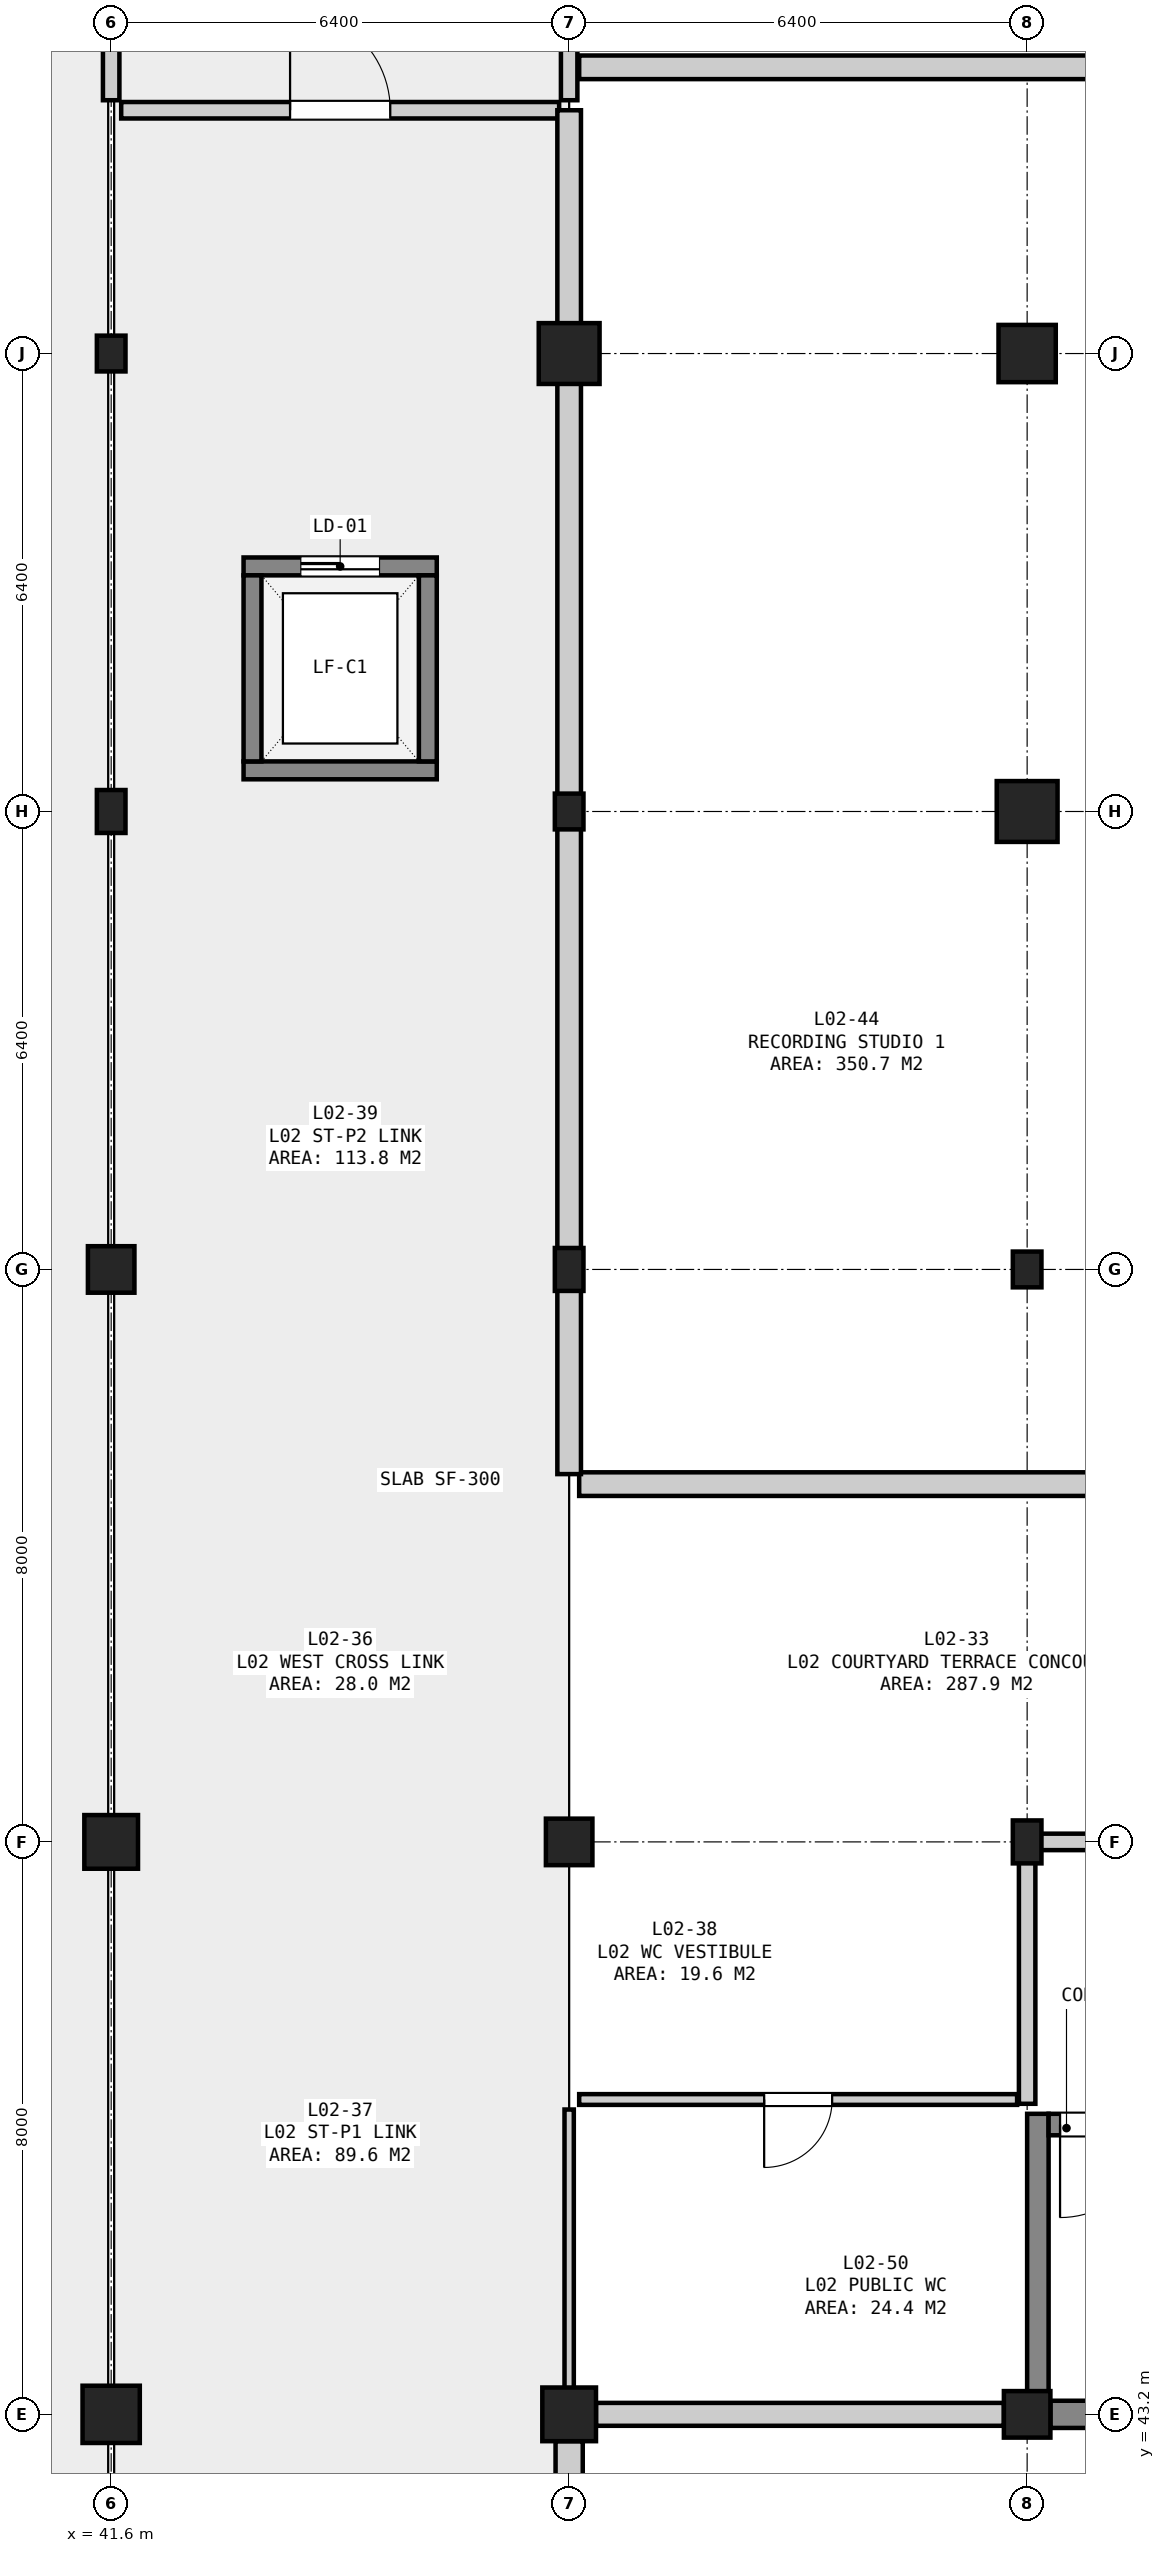
"""IFC4 building model, lengths in metres.
Left out: names, types, materials, properties, quantities, classifications, styles, units other than length and angle.
Written with IfcOpenShell. Run it as: python <this file> out.ifc"""

import sys

from ifc_helpers import new_model, si_unit, direction, frame, frame_2d, origin, origin_2d, place, context, subcontext, project, spatial, rectangle, extrude, element, fill, save


model = new_model("IFC4")
c1 = context("Model", 3, precision=1e-05, world=origin(), true_north=direction((0.0, 1.0)))
c2 = subcontext(c1, "Body", "Model", "MODEL_VIEW")
j1 = project(units=[si_unit("LENGTHUNIT", "METRE"), si_unit("PLANEANGLEUNIT", "RADIAN")], contexts=[c1])
p1 = place(None, origin())
s1 = spatial("IfcSite", under=j1, at=p1, CompositionType="ELEMENT")
p2 = place(p1, origin())
s2 = spatial("IfcBuilding", under=s1, at=p2, CompositionType="ELEMENT")
p3 = place(p2, frame((0.0, 0.0, 10.8)))
s3 = spatial("IfcBuildingStorey", under=s2, at=p3, CompositionType="ELEMENT", Elevation=10.8)
p4 = place(p3, frame((41.6, 43.2, 0.0), z_axis=(0.0, 0.0, 1.0), x_axis=(1.0, 0.0, 0.0)))
e1 = element("IfcColumn", 1, at=p4, inside=s3, PredefinedType="COLUMN", context=c2, shape_type="SweptSolid", body=[
    extrude(rectangle(XDim=0.8, YDim=0.8, at=origin_2d()), origin(), (0.0, 0.0, 1.0), 4.8),
])
p5 = place(p3, frame((41.6, 51.2, 0.0), z_axis=(0.0, 0.0, 1.0), x_axis=(1.0, 0.0, 0.0)))
e2 = element("IfcColumn", 2, at=p5, inside=s3, PredefinedType="COLUMN", context=c2, shape_type="SweptSolid", body=[
    extrude(rectangle(XDim=0.75, YDim=0.75, at=origin_2d()), origin(), (0.0, 0.0, 1.0), 4.8),
])
p6 = place(p3, frame((41.6, 59.2, 0.0), z_axis=(0.0, 0.0, 1.0), x_axis=(1.0, 0.0, 0.0)))
e3 = element("IfcColumn", 3, at=p6, inside=s3, PredefinedType="COLUMN", context=c2, shape_type="SweptSolid", body=[
    extrude(rectangle(XDim=0.65, YDim=0.65, at=origin_2d()), origin(), (0.0, 0.0, 1.0), 4.8),
])
p7 = place(p3, frame((41.6, 65.6, 0.0), z_axis=(0.0, 0.0, 1.0), x_axis=(1.0, 0.0, 0.0)))
e4 = element("IfcColumn", 4, at=p7, inside=s3, PredefinedType="COLUMN", context=c2, shape_type="SweptSolid", body=[
    extrude(rectangle(XDim=0.4, YDim=0.6, at=origin_2d()), origin(), (0.0, 0.0, 1.0), 4.8),
])
p8 = place(p3, frame((41.6, 72.0, 0.0), z_axis=(0.0, 0.0, 1.0), x_axis=(1.0, 0.0, 0.0)))
e5 = element("IfcColumn", 5, at=p8, inside=s3, PredefinedType="COLUMN", context=c2, shape_type="SweptSolid", body=[
    extrude(rectangle(XDim=0.4, YDim=0.5, at=origin_2d()), origin(), (0.0, 0.0, 1.0), 4.8),
])
p9 = place(p3, frame((48.0, 43.2, 0.0), z_axis=(0.0, 0.0, 1.0), x_axis=(1.0, 0.0, 0.0)))
e6 = element("IfcColumn", 6, at=p9, inside=s3, PredefinedType="COLUMN", context=c2, shape_type="SweptSolid", body=[
    extrude(rectangle(XDim=0.75, YDim=0.75, at=origin_2d()), origin(), (0.0, 0.0, 1.0), 4.8),
])
p10 = place(p3, frame((48.0, 51.2, 0.0), z_axis=(0.0, 0.0, 1.0), x_axis=(1.0, 0.0, 0.0)))
e7 = element("IfcColumn", 7, at=p10, inside=s3, PredefinedType="COLUMN", context=c2, shape_type="SweptSolid", body=[
    extrude(rectangle(XDim=0.65, YDim=0.65, at=origin_2d()), origin(), (0.0, 0.0, 1.0), 4.8),
])
p11 = place(p3, frame((48.0, 59.2, 0.0), z_axis=(0.0, 0.0, 1.0), x_axis=(1.0, 0.0, 0.0)))
e8 = element("IfcColumn", 8, at=p11, inside=s3, PredefinedType="COLUMN", context=c2, shape_type="SweptSolid", body=[
    extrude(rectangle(XDim=0.4, YDim=0.6, at=origin_2d()), origin(), (0.0, 0.0, 1.0), 4.8),
])
p12 = place(p3, frame((48.0, 65.6, 0.0), z_axis=(0.0, 0.0, 1.0), x_axis=(1.0, 0.0, 0.0)))
e9 = element("IfcColumn", 9, at=p12, inside=s3, PredefinedType="COLUMN", context=c2, shape_type="SweptSolid", body=[
    extrude(rectangle(XDim=0.4, YDim=0.5, at=origin_2d()), origin(), (0.0, 0.0, 1.0), 4.8),
])
p13 = place(p3, frame((48.0, 72.0, 0.0), z_axis=(0.0, 0.0, 1.0), x_axis=(1.0, 0.0, 0.0)))
e10 = element("IfcColumn", 10, at=p13, inside=s3, PredefinedType="COLUMN", context=c2, shape_type="SweptSolid", body=[
    extrude(rectangle(XDim=0.85, YDim=0.85, at=origin_2d()), origin(), (0.0, 0.0, 1.0), 4.8),
])
p14 = place(p3, frame((54.4, 43.2, 0.0), z_axis=(0.0, 0.0, 1.0), x_axis=(1.0, 0.0, 0.0)))
e11 = element("IfcColumn", 11, at=p14, inside=s3, PredefinedType="COLUMN", context=c2, shape_type="SweptSolid", body=[
    extrude(rectangle(XDim=0.65, YDim=0.65, at=origin_2d()), origin(), (0.0, 0.0, 1.0), 4.8),
])
p15 = place(p3, frame((54.4, 51.2, 0.0), z_axis=(0.0, 0.0, 1.0), x_axis=(1.0, 0.0, 0.0)))
e12 = element("IfcColumn", 12, at=p15, inside=s3, PredefinedType="COLUMN", context=c2, shape_type="SweptSolid", body=[
    extrude(rectangle(XDim=0.4, YDim=0.6, at=origin_2d()), origin(), (0.0, 0.0, 1.0), 4.8),
])
p16 = place(p3, frame((54.4, 59.2, 0.0), z_axis=(0.0, 0.0, 1.0), x_axis=(1.0, 0.0, 0.0)))
e13 = element("IfcColumn", 13, at=p16, inside=s3, PredefinedType="COLUMN", context=c2, shape_type="SweptSolid", body=[
    extrude(rectangle(XDim=0.4, YDim=0.5, at=origin_2d()), origin(), (0.0, 0.0, 1.0), 4.8),
])
p17 = place(p3, frame((54.4, 65.6, 0.0), z_axis=(0.0, 0.0, 1.0), x_axis=(1.0, 0.0, 0.0)))
e14 = element("IfcColumn", 14, at=p17, inside=s3, PredefinedType="COLUMN", context=c2, shape_type="SweptSolid", body=[
    extrude(rectangle(XDim=0.85, YDim=0.85, at=origin_2d()), origin(), (0.0, 0.0, 1.0), 4.8),
])
p18 = place(p3, frame((54.4, 72.0, 0.0), z_axis=(0.0, 0.0, 1.0), x_axis=(1.0, 0.0, 0.0)))
e15 = element("IfcColumn", 15, at=p18, inside=s3, PredefinedType="COLUMN", context=c2, shape_type="SweptSolid", body=[
    extrude(rectangle(XDim=0.8, YDim=0.8, at=origin_2d()), origin(), (0.0, 0.0, 1.0), 4.8),
])
p19 = place(p3, frame((48.0, 36.4, 0.0), z_axis=(0.0, 0.0, 1.0), x_axis=(0.0, 1.0, 0.0)))
e16 = element("IfcWall", 16, at=p19, inside=s3, PredefinedType="SOLIDWALL", context=c2, shape_type="SweptSolid", body=[
    extrude(rectangle(XDim=6.425, YDim=0.38, at=frame_2d((3.212, 0.0))), origin(), (0.0, 0.0, 1.0), 3.89),
])
p20 = place(p19, frame((1.462, 0.0, 0.9)))
e17 = element("IfcOpeningElement", 17, at=p20, cuts=e16, PredefinedType="OPENING", context=c2, shape_type="SweptSolid", body=[
    extrude(rectangle(XDim=1.8, YDim=2.1, at=frame_2d((0.9, 1.05))), frame((0.0, 0.202, 0.0), z_axis=(0.0, -1.0, 0.0), x_axis=(1.0, 0.0, 0.0)), (0.0, 0.0, 1.0), 0.404),
])
p21 = place(p3, frame((48.375, 43.2, 0.0), z_axis=(0.0, 0.0, 1.0), x_axis=(1.0, 0.0, 0.0)))
e18 = element("IfcWall", 18, at=p21, inside=s3, PredefinedType="SOLIDWALL", context=c2, shape_type="SweptSolid", body=[
    extrude(rectangle(XDim=5.7, YDim=0.32, at=frame_2d((2.85, 0.0))), origin(), (0.0, 0.0, 1.0), 3.9),
])
p22 = place(p3, frame((54.725, 43.2, 0.0), z_axis=(0.0, 0.0, 1.0), x_axis=(1.0, 0.0, 0.0)))
e19 = element("IfcWall", 19, at=p22, inside=s3, PredefinedType="SOLIDWALL", context=c2, shape_type="SweptSolid", body=[
    extrude(rectangle(XDim=7.475, YDim=0.38, at=frame_2d((3.737, 0.0))), origin(), (0.0, 0.0, 1.0), 4.195),
])
p23 = place(p22, frame((2.938, 0.0, 0.9)))
e20 = element("IfcOpeningElement", 20, at=p23, cuts=e19, PredefinedType="OPENING", context=c2, shape_type="SweptSolid", body=[
    extrude(rectangle(XDim=1.6, YDim=1.95, at=frame_2d((0.8, 0.975))), frame((0.0, 0.202, 0.0), z_axis=(0.0, -1.0, 0.0), x_axis=(1.0, 0.0, 0.0)), (0.0, 0.0, 1.0), 0.404),
])
p24 = place(p3, frame((54.55, 43.2, 0.0), z_axis=(0.0, 0.0, 1.0), x_axis=(0.0, 1.0, 0.0)))
e21 = element("IfcWall", 21, at=p24, inside=s3, PredefinedType="SHEAR", context=c2, shape_type="SweptSolid", body=[
    extrude(rectangle(XDim=4.2, YDim=0.3, at=frame_2d((2.1, 0.0))), origin(), (0.0, 0.0, 1.0), 4.5),
])
p25 = place(p3, frame((54.7, 47.25, 0.0), z_axis=(0.0, 0.0, 1.0), x_axis=(1.0, 0.0, 0.0)))
e22 = element("IfcWall", 22, at=p25, inside=s3, PredefinedType="SHEAR", context=c2, shape_type="SweptSolid", body=[
    extrude(rectangle(XDim=7.4, YDim=0.3, at=frame_2d((3.7, 0.0))), origin(), (0.0, 0.0, 1.0), 4.5),
])
p26 = place(p25, frame((0.16, 0.0, 0.0)))
e23 = element("IfcOpeningElement", 23, at=p26, cuts=e22, PredefinedType="OPENING", context=c2, shape_type="SweptSolid", body=[
    extrude(rectangle(XDim=1.3, YDim=2.18, at=frame_2d((0.65, 1.09))), frame((0.0, 0.162, 0.0), z_axis=(0.0, -1.0, 0.0), x_axis=(1.0, 0.0, 0.0)), (0.0, 0.0, 1.0), 0.324),
])
p27 = place(p3, frame((43.45, 66.175, 0.0), z_axis=(0.0, 0.0, 1.0), x_axis=(1.0, 0.0, 0.0)))
e24 = element("IfcWall", 24, at=p27, inside=s3, PredefinedType="SHEAR", context=c2, shape_type="SweptSolid", body=[
    extrude(rectangle(XDim=2.7, YDim=0.25, at=frame_2d((1.35, 0.0))), origin(), (0.0, 0.0, 1.0), 4.5),
])
p28 = place(p3, frame((43.45, 69.025, 0.0), z_axis=(0.0, 0.0, 1.0), x_axis=(1.0, 0.0, 0.0)))
e25 = element("IfcWall", 25, at=p28, inside=s3, PredefinedType="SHEAR", context=c2, shape_type="SweptSolid", body=[
    extrude(rectangle(XDim=2.7, YDim=0.25, at=frame_2d((1.35, 0.0))), origin(), (0.0, 0.0, 1.0), 4.5),
])
p29 = place(p28, frame((0.8, 0.0, 0.0)))
e26 = element("IfcOpeningElement", 26, at=p29, cuts=e25, PredefinedType="OPENING", context=c2, shape_type="SweptSolid", body=[
    extrude(rectangle(XDim=1.1, YDim=2.15, at=frame_2d((0.55, 1.075))), frame((0.0, 0.137, 0.0), z_axis=(0.0, -1.0, 0.0), x_axis=(1.0, 0.0, 0.0)), (0.0, 0.0, 1.0), 0.274),
])
for number, where, z_axis, x_axis in (
    (27, (43.575, 66.3, 0.0), (0.0, 0.0, 1.0), (0.0, 1.0, 0.0)),
    (28, (46.025, 66.3, 0.0), (0.0, 0.0, 1.0), (0.0, 1.0, 0.0)),
):
    element("IfcWall", number, at=place(p3, frame(where, z_axis=z_axis, x_axis=x_axis)), inside=s3, PredefinedType="SHEAR", context=c2, shape_type="SweptSolid", body=[
        extrude(rectangle(XDim=2.6, YDim=0.25, at=frame_2d((1.3, 0.0))), origin(), (0.0, 0.0, 1.0), 4.5),
    ])
p30 = place(p3, frame((41.74, 75.4, 0.0), z_axis=(0.0, 0.0, 1.0), x_axis=(1.0, 0.0, 0.0)))
e29 = element("IfcWall", 29, at=p30, inside=s3, PredefinedType="SOLIDWALL", context=c2, shape_type="SweptSolid", body=[
    extrude(rectangle(XDim=6.12, YDim=0.23, at=frame_2d((3.06, 0.0))), origin(), (0.0, 0.0, 1.0), 4.5),
])
p31 = place(p30, frame((2.36, 0.0, 0.0)))
e30 = element("IfcOpeningElement", 30, at=p31, cuts=e29, PredefinedType="OPENING", context=c2, shape_type="SweptSolid", body=[
    extrude(rectangle(XDim=1.4, YDim=2.2, at=frame_2d((0.7, 1.1))), frame((0.0, 0.127, 0.0), z_axis=(0.0, -1.0, 0.0), x_axis=(1.0, 0.0, 0.0)), (0.0, 0.0, 1.0), 0.254),
])
p32 = place(p3, frame((41.6, 75.54, 0.0), z_axis=(0.0, 0.0, 1.0), x_axis=(0.0, 1.0, 0.0)))
e31 = element("IfcWall", 31, at=p32, inside=s3, PredefinedType="SOLIDWALL", context=c2, shape_type="SweptSolid", body=[
    extrude(rectangle(XDim=3.52, YDim=0.23, at=frame_2d((1.76, 0.0))), origin(), (0.0, 0.0, 1.0), 4.5),
])
p33 = place(p3, frame((48.0, 75.54, 0.0), z_axis=(0.0, 0.0, 1.0), x_axis=(0.0, 1.0, 0.0)))
e32 = element("IfcWall", 32, at=p33, inside=s3, PredefinedType="SOLIDWALL", context=c2, shape_type="SweptSolid", body=[
    extrude(rectangle(XDim=3.52, YDim=0.23, at=frame_2d((1.76, 0.0))), origin(), (0.0, 0.0, 1.0), 3.9),
])
p34 = place(p3, frame((54.54, 51.2, 0.0), z_axis=(0.0, 0.0, 1.0), x_axis=(1.0, 0.0, 0.0)))
e33 = element("IfcWall", 33, at=p34, inside=s3, PredefinedType="SOLIDWALL", context=c2, shape_type="SweptSolid", body=[
    extrude(rectangle(XDim=7.655, YDim=0.23, at=frame_2d((3.828, 0.0))), origin(), (0.0, 0.0, 1.0), 3.695),
])
p35 = place(p34, frame((3.56, 0.0, 0.0)))
e34 = element("IfcOpeningElement", 34, at=p35, cuts=e33, PredefinedType="OPENING", context=c2, shape_type="SweptSolid", body=[
    extrude(rectangle(XDim=1.4, YDim=2.2, at=frame_2d((0.7, 1.1))), frame((0.0, 0.127, 0.0), z_axis=(0.0, -1.0, 0.0), x_axis=(1.0, 0.0, 0.0)), (0.0, 0.0, 1.0), 0.254),
])
p36 = place(p3, frame((54.4, 47.54, 0.0), z_axis=(0.0, 0.0, 1.0), x_axis=(0.0, 1.0, 0.0)))
e35 = element("IfcWall", 35, at=p36, inside=s3, PredefinedType="SOLIDWALL", context=c2, shape_type="SweptSolid", body=[
    extrude(rectangle(XDim=3.52, YDim=0.23, at=frame_2d((1.76, 0.0))), origin(), (0.0, 0.0, 1.0), 3.745),
])
p37 = place(p3, frame((48.14, 56.2, 0.0), z_axis=(0.0, 0.0, 1.0), x_axis=(1.0, 0.0, 0.0)))
e36 = element("IfcWall", 36, at=p37, inside=s3, PredefinedType="SOLIDWALL", context=c2, shape_type="SweptSolid", body=[
    extrude(rectangle(XDim=18.12, YDim=0.33, at=frame_2d((9.06, 0.0))), origin(), (0.0, 0.0, 1.0), 4.5),
])
p38 = place(p37, frame((8.26, 0.0, 0.0)))
e37 = element("IfcOpeningElement", 37, at=p38, cuts=e36, PredefinedType="OPENING", context=c2, shape_type="SweptSolid", body=[
    extrude(rectangle(XDim=1.6, YDim=2.25, at=frame_2d((0.8, 1.125))), frame((0.0, 0.177, 0.0), z_axis=(0.0, -1.0, 0.0), x_axis=(1.0, 0.0, 0.0)), (0.0, 0.0, 1.0), 0.354),
])
p39 = place(p3, frame((48.14, 76.0, 0.0), z_axis=(0.0, 0.0, 1.0), x_axis=(1.0, 0.0, 0.0)))
e38 = element("IfcWall", 38, at=p39, inside=s3, PredefinedType="SOLIDWALL", context=c2, shape_type="SweptSolid", body=[
    extrude(rectangle(XDim=18.12, YDim=0.33, at=frame_2d((9.06, 0.0))), origin(), (0.0, 0.0, 1.0), 4.5),
])
p40 = place(p3, frame((48.0, 56.34, 0.0), z_axis=(0.0, 0.0, 1.0), x_axis=(0.0, 1.0, 0.0)))
e39 = element("IfcWall", 39, at=p40, inside=s3, PredefinedType="SOLIDWALL", context=c2, shape_type="SweptSolid", body=[
    extrude(rectangle(XDim=19.06, YDim=0.33, at=frame_2d((9.53, 0.0))), origin(), (0.0, 0.0, 1.0), 3.9),
])
p41 = place(p3, frame((48.14, 47.6, 0.0), z_axis=(0.0, 0.0, 1.0), x_axis=(1.0, 0.0, 0.0)))
e40 = element("IfcWall", 40, at=p41, inside=s3, PredefinedType="PARTITIONING", context=c2, shape_type="SweptSolid", body=[
    extrude(rectangle(XDim=6.12, YDim=0.15, at=frame_2d((3.06, 0.0))), origin(), (0.0, 0.0, 1.0), 4.5),
])
p42 = place(p41, frame((2.585, 0.0, 0.0)))
e41 = element("IfcOpeningElement", 41, at=p42, cuts=e40, PredefinedType="OPENING", context=c2, shape_type="SweptSolid", body=[
    extrude(rectangle(XDim=0.95, YDim=2.15, at=frame_2d((0.475, 1.075))), frame((0.0, 0.087, 0.0), z_axis=(0.0, -1.0, 0.0), x_axis=(1.0, 0.0, 0.0)), (0.0, 0.0, 1.0), 0.174),
])
p43 = place(p3, frame((48.0, 43.305, 0.0), z_axis=(0.0, 0.0, 1.0), x_axis=(0.0, 1.0, 0.0)))
e42 = element("IfcWall", 42, at=p43, inside=s3, PredefinedType="PARTITIONING", context=c2, shape_type="SweptSolid", body=[
    extrude(rectangle(XDim=4.155, YDim=0.13, at=frame_2d((2.078, 0.0))), origin(), (0.0, 0.0, 1.0), 3.9),
])
p44 = place(p26, frame((1.3, 0.0, 0.0), z_axis=(0.0, 0.0, 1.0), x_axis=(-1.0, 0.0, 0.0)))
e43 = element("IfcDoor", 43, at=p44, inside=s3, OperationType="SINGLE_SWING_RIGHT", PredefinedType="DOOR", context=c2, shape_type="SweptSolid", body=[
    extrude(rectangle(XDim=1.3, YDim=2.18, at=frame_2d((0.65, 1.09))), frame((0.0, 0.025, 0.0), z_axis=(0.0, -1.0, 0.0), x_axis=(1.0, 0.0, 0.0)), (0.0, 0.0, 1.0), 0.05),
])
fill(e23, e43)
p45 = place(p29, origin())
e44 = element("IfcDoor", 44, at=p45, inside=s3, OperationType="SLIDING_TO_LEFT", PredefinedType="DOOR", context=c2, shape_type="SweptSolid", body=[
    extrude(rectangle(XDim=1.1, YDim=2.15, at=frame_2d((0.55, 1.075))), frame((0.0, 0.025, 0.0), z_axis=(0.0, -1.0, 0.0), x_axis=(1.0, 0.0, 0.0)), (0.0, 0.0, 1.0), 0.05),
])
fill(e26, e44)
p46 = place(p31, origin())
e45 = element("IfcDoor", 45, at=p46, inside=s3, OperationType="SINGLE_SWING_LEFT", PredefinedType="DOOR", context=c2, shape_type="SweptSolid", body=[
    extrude(rectangle(XDim=1.4, YDim=2.2, at=frame_2d((0.7, 1.1))), frame((0.0, 0.025, 0.0), z_axis=(0.0, -1.0, 0.0), x_axis=(1.0, 0.0, 0.0)), (0.0, 0.0, 1.0), 0.05),
])
fill(e30, e45)
p47 = place(p42, frame((0.95, 0.0, 0.0), z_axis=(0.0, 0.0, 1.0), x_axis=(-1.0, 0.0, 0.0)))
e46 = element("IfcDoor", 46, at=p47, inside=s3, OperationType="SINGLE_SWING_RIGHT", PredefinedType="DOOR", context=c2, shape_type="SweptSolid", body=[
    extrude(rectangle(XDim=0.95, YDim=2.15, at=frame_2d((0.475, 1.075))), frame((0.0, 0.025, 0.0), z_axis=(0.0, -1.0, 0.0), x_axis=(1.0, 0.0, 0.0)), (0.0, 0.0, 1.0), 0.05),
])
fill(e41, e46)
save(model, sys.argv[1])
